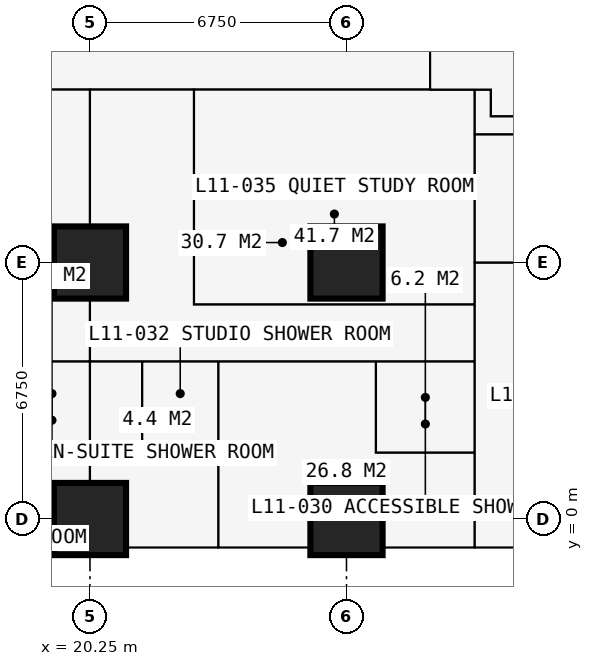
"""IFC4 building model, lengths in metres.
Left out: names, types, materials, properties, quantities, classifications, styles, units other than length and angle.
Written with IfcOpenShell. Run it as: python <this file> out.ifc"""

import sys

from ifc_helpers import new_model, si_unit, direction, frame, frame_2d, origin, origin_2d, place, context, subcontext, project, spatial, rectangle, extrude, element, fill, save


model = new_model("IFC4")
c1 = context("Model", 3, precision=1e-05, world=origin(), true_north=direction((0.0, 1.0)))
c2 = subcontext(c1, "Body", "Model", "MODEL_VIEW")
j1 = project(units=[si_unit("LENGTHUNIT", "METRE"), si_unit("PLANEANGLEUNIT", "RADIAN")], contexts=[c1])
p1 = place(None, origin())
s1 = spatial("IfcSite", under=j1, at=p1, CompositionType="ELEMENT")
p2 = place(p1, origin())
s2 = spatial("IfcBuilding", under=s1, at=p2, CompositionType="ELEMENT")
p3 = place(p2, frame((0.0, 0.0, 43.2)))
s3 = spatial("IfcBuildingStorey", under=s2, at=p3, CompositionType="ELEMENT", Elevation=43.2)
for number, where, z_axis, x_axis in (
    (1, (20.25, 0.0, 0.0), (0.0, 0.0, 1.0), (1.0, 0.0, 0.0)),
    (2, (20.25, 6.75, 0.0), (0.0, 0.0, 1.0), (1.0, 0.0, 0.0)),
    (3, (27.0, 0.0, 0.0), (0.0, 0.0, 1.0), (1.0, 0.0, 0.0)),
    (4, (27.0, 6.75, 0.0), (0.0, 0.0, 1.0), (1.0, 0.0, 0.0)),
):
    element("IfcColumn", number, at=place(p3, frame(where, z_axis=z_axis, x_axis=x_axis)), inside=s3, PredefinedType="COLUMN", context=c2, shape_type="SweptSolid", body=[
        extrude(rectangle(XDim=1.9, YDim=1.9, at=origin_2d()), origin(), (0.0, 0.0, 1.0), 3.6),
    ])
p4 = place(p3, frame((27.0, -0.75, 0.0), z_axis=(0.0, 0.0, 1.0), x_axis=(-1.0, 0.0, 0.0)))
e5 = element("IfcWall", 5, at=p4, inside=s3, PredefinedType="SOLIDWALL", context=c2, shape_type="SweptSolid", body=[
    extrude(rectangle(XDim=6.75, YDim=0.15, at=frame_2d((3.375, 0.0))), origin(), (0.0, 0.0, 1.0), 3.375),
])
p5 = place(p4, frame((0.996, 0.0, 0.0)))
e6 = element("IfcOpeningElement", 6, at=p5, cuts=e5, PredefinedType="OPENING", context=c2, shape_type="SweptSolid", body=[
    extrude(rectangle(XDim=1.0, YDim=2.2, at=frame_2d((0.5, 1.1))), frame((0.0, 0.085, 0.0), z_axis=(0.0, -1.0, 0.0), x_axis=(1.0, 0.0, 0.0)), (0.0, 0.0, 1.0), 0.17),
])
p6 = place(p4, frame((2.042, 0.0, 0.9)))
e7 = element("IfcOpeningElement", 7, at=p6, cuts=e5, PredefinedType="OPENING", context=c2, shape_type="SweptSolid", body=[
    extrude(rectangle(XDim=1.2, YDim=1.8, at=frame_2d((0.6, 0.9))), frame((0.0, 0.085, 0.0), z_axis=(0.0, -1.0, 0.0), x_axis=(1.0, 0.0, 0.0)), (0.0, 0.0, 1.0), 0.17),
])
p7 = place(p4, frame((4.754, 0.0, 0.0)))
e8 = element("IfcOpeningElement", 8, at=p7, cuts=e5, PredefinedType="OPENING", context=c2, shape_type="SweptSolid", body=[
    extrude(rectangle(XDim=1.0, YDim=2.2, at=frame_2d((0.5, 1.1))), frame((0.0, 0.085, 0.0), z_axis=(0.0, -1.0, 0.0), x_axis=(1.0, 0.0, 0.0)), (0.0, 0.0, 1.0), 0.17),
])
p8 = place(p4, frame((3.508, 0.0, 0.9)))
e9 = element("IfcOpeningElement", 9, at=p8, cuts=e5, PredefinedType="OPENING", context=c2, shape_type="SweptSolid", body=[
    extrude(rectangle(XDim=1.2, YDim=1.8, at=frame_2d((0.6, 0.9))), frame((0.0, 0.085, 0.0), z_axis=(0.0, -1.0, 0.0), x_axis=(1.0, 0.0, 0.0)), (0.0, 0.0, 1.0), 0.17),
])
p9 = place(p3, frame((23.625, -0.85, 0.0), z_axis=(0.0, 0.0, 1.0), x_axis=(0.0, -1.0, 0.0)))
e10 = element("IfcWall", 10, at=p9, inside=s3, PredefinedType="USERDEFINED", context=c2, shape_type="SweptSolid", body=[
    extrude(rectangle(XDim=2.2, YDim=1.0, at=frame_2d((1.1, 0.0))), origin(), (0.0, 0.0, 1.0), 0.9),
])
p10 = place(p3, frame((6.75, 4.15, 0.0), z_axis=(0.0, 0.0, 1.0), x_axis=(1.0, 0.0, 0.0)))
e11 = element("IfcWall", 11, at=p10, inside=s3, PredefinedType="PARTITIONING", context=c2, shape_type="SweptSolid", body=[
    extrude(rectangle(XDim=23.625, YDim=0.1, at=frame_2d((11.812, 0.0))), origin(), (0.0, 0.0, 1.0), 3.375),
])
p11 = place(p10, frame((0.2, 0.0, 0.0)))
e12 = element("IfcOpeningElement", 12, at=p11, cuts=e11, PredefinedType="OPENING", context=c2, shape_type="SweptSolid", body=[
    extrude(rectangle(XDim=0.95, YDim=2.2, at=frame_2d((0.475, 1.1))), frame((0.0, 0.06, 0.0), z_axis=(0.0, -1.0, 0.0), x_axis=(1.0, 0.0, 0.0)), (0.0, 0.0, 1.0), 0.12),
])
p12 = place(p10, frame((3.625, 0.0, 0.0)))
e13 = element("IfcOpeningElement", 13, at=p12, cuts=e11, PredefinedType="OPENING", context=c2, shape_type="SweptSolid", body=[
    extrude(rectangle(XDim=0.95, YDim=2.2, at=frame_2d((0.475, 1.1))), frame((0.0, 0.06, 0.0), z_axis=(0.0, -1.0, 0.0), x_axis=(1.0, 0.0, 0.0)), (0.0, 0.0, 1.0), 0.12),
])
p13 = place(p10, frame((7.0, 0.0, 0.0)))
e14 = element("IfcOpeningElement", 14, at=p13, cuts=e11, PredefinedType="OPENING", context=c2, shape_type="SweptSolid", body=[
    extrude(rectangle(XDim=0.95, YDim=2.2, at=frame_2d((0.475, 1.1))), frame((0.0, 0.06, 0.0), z_axis=(0.0, -1.0, 0.0), x_axis=(1.0, 0.0, 0.0)), (0.0, 0.0, 1.0), 0.12),
])
p14 = place(p10, frame((10.375, 0.0, 0.0)))
e15 = element("IfcOpeningElement", 15, at=p14, cuts=e11, PredefinedType="OPENING", context=c2, shape_type="SweptSolid", body=[
    extrude(rectangle(XDim=0.95, YDim=2.2, at=frame_2d((0.475, 1.1))), frame((0.0, 0.06, 0.0), z_axis=(0.0, -1.0, 0.0), x_axis=(1.0, 0.0, 0.0)), (0.0, 0.0, 1.0), 0.12),
])
p15 = place(p10, frame((18.475, 0.0, 0.0)))
e16 = element("IfcOpeningElement", 16, at=p15, cuts=e11, PredefinedType="OPENING", context=c2, shape_type="SweptSolid", body=[
    extrude(rectangle(XDim=0.95, YDim=2.2, at=frame_2d((0.475, 1.1))), frame((0.0, 0.06, 0.0), z_axis=(0.0, -1.0, 0.0), x_axis=(1.0, 0.0, 0.0)), (0.0, 0.0, 1.0), 0.12),
])
p16 = place(p10, frame((13.7, 0.0, 0.0)))
e17 = element("IfcOpeningElement", 17, at=p16, cuts=e11, PredefinedType="OPENING", context=c2, shape_type="SweptSolid", body=[
    extrude(rectangle(XDim=0.95, YDim=2.2, at=frame_2d((0.475, 1.1))), frame((0.0, 0.06, 0.0), z_axis=(0.0, -1.0, 0.0), x_axis=(1.0, 0.0, 0.0)), (0.0, 0.0, 1.0), 0.12),
])
p17 = place(p3, frame((10.125, 11.3, 0.0), z_axis=(0.0, 0.0, 1.0), x_axis=(1.0, 0.0, 0.0)))
e18 = element("IfcWall", 18, at=p17, inside=s3, PredefinedType="PARTITIONING", context=c2, shape_type="SweptSolid", body=[
    extrude(rectangle(XDim=20.675, YDim=0.15, at=frame_2d((10.337, 0.0))), origin(), (0.0, 0.0, 1.0), 3.375),
])
p18 = place(p17, frame((8.375, 0.0, 0.0)))
e19 = element("IfcOpeningElement", 19, at=p18, cuts=e18, PredefinedType="OPENING", context=c2, shape_type="SweptSolid", body=[
    extrude(rectangle(XDim=1.0, YDim=2.2, at=frame_2d((0.5, 1.1))), frame((0.0, 0.085, 0.0), z_axis=(0.0, -1.0, 0.0), x_axis=(1.0, 0.0, 0.0)), (0.0, 0.0, 1.0), 0.17),
])
p19 = place(p17, frame((10.975, 0.0, 0.0)))
e20 = element("IfcOpeningElement", 20, at=p19, cuts=e18, PredefinedType="OPENING", context=c2, shape_type="SweptSolid", body=[
    extrude(rectangle(XDim=1.0, YDim=2.2, at=frame_2d((0.5, 1.1))), frame((0.0, 0.085, 0.0), z_axis=(0.0, -1.0, 0.0), x_axis=(1.0, 0.0, 0.0)), (0.0, 0.0, 1.0), 0.17),
])
p20 = place(p17, frame((3.925, 0.0, 0.0)))
e21 = element("IfcOpeningElement", 21, at=p20, cuts=e18, PredefinedType="OPENING", context=c2, shape_type="SweptSolid", body=[
    extrude(rectangle(XDim=0.95, YDim=2.2, at=frame_2d((0.475, 1.1))), frame((0.0, 0.085, 0.0), z_axis=(0.0, -1.0, 0.0), x_axis=(1.0, 0.0, 0.0)), (0.0, 0.0, 1.0), 0.17),
])
p21 = place(p3, frame((18.25, 1.95, 0.0), z_axis=(0.0, 0.0, 1.0), x_axis=(1.0, 0.0, 0.0)))
e22 = element("IfcWall", 22, at=p21, inside=s3, PredefinedType="PARTITIONING", context=c2, shape_type="SweptSolid", body=[
    extrude(rectangle(XDim=2.0, YDim=0.1, at=frame_2d((1.0, 0.0))), origin(), (0.0, 0.0, 1.0), 3.375),
])
p22 = place(p3, frame((20.25, -0.734, 0.0), z_axis=(0.0, 0.0, 1.0), x_axis=(0.0, 1.0, 0.0)))
e23 = element("IfcWall", 23, at=p22, inside=s3, PredefinedType="PARTITIONING", context=c2, shape_type="SweptSolid", body=[
    extrude(rectangle(XDim=12.034, YDim=0.15, at=frame_2d((6.017, 0.0))), origin(), (0.0, 0.0, 1.0), 2.61),
])
p23 = place(p3, frame((21.625, 1.95, 0.0), z_axis=(0.0, 0.0, 1.0), x_axis=(0.0, 1.0, 0.0)))
e24 = element("IfcWall", 24, at=p23, inside=s3, PredefinedType="PARTITIONING", context=c2, shape_type="SweptSolid", body=[
    extrude(rectangle(XDim=2.2, YDim=0.1, at=frame_2d((1.1, 0.0))), origin(), (0.0, 0.0, 1.0), 3.375),
])
p24 = place(p3, frame((21.625, 1.95, 0.0), z_axis=(0.0, 0.0, 1.0), x_axis=(1.0, 0.0, 0.0)))
e25 = element("IfcWall", 25, at=p24, inside=s3, PredefinedType="PARTITIONING", context=c2, shape_type="SweptSolid", body=[
    extrude(rectangle(XDim=2.0, YDim=0.1, at=frame_2d((1.0, 0.0))), origin(), (0.0, 0.0, 1.0), 3.375),
])
p25 = place(p3, frame((22.988, 5.65, 0.0), z_axis=(0.0, 0.0, 1.0), x_axis=(1.0, 0.0, 0.0)))
e26 = element("IfcWall", 26, at=p25, inside=s3, PredefinedType="PARTITIONING", context=c2, shape_type="SweptSolid", body=[
    extrude(rectangle(XDim=7.387, YDim=0.15, at=frame_2d((3.694, 0.0))), origin(), (0.0, 0.0, 1.0), 3.375),
])
p26 = place(p25, frame((2.1, 0.0, 0.0)))
e27 = element("IfcOpeningElement", 27, at=p26, cuts=e26, PredefinedType="OPENING", context=c2, shape_type="SweptSolid", body=[
    extrude(rectangle(XDim=0.95, YDim=2.2, at=frame_2d((0.475, 1.1))), frame((0.0, 0.085, 0.0), z_axis=(0.0, -1.0, 0.0), x_axis=(1.0, 0.0, 0.0)), (0.0, 0.0, 1.0), 0.17),
])
p27 = place(p3, frame((22.988, 5.65, 0.0), z_axis=(0.0, 0.0, 1.0), x_axis=(0.0, 1.0, 0.0)))
e28 = element("IfcWall", 28, at=p27, inside=s3, PredefinedType="PARTITIONING", context=c2, shape_type="SweptSolid", body=[
    extrude(rectangle(XDim=5.65, YDim=0.15, at=frame_2d((2.825, 0.0))), origin(), (0.0, 0.0, 1.0), 3.375),
])
p28 = place(p3, frame((23.625, -0.734, 0.0), z_axis=(0.0, 0.0, 1.0), x_axis=(0.0, 1.0, 0.0)))
e29 = element("IfcWall", 29, at=p28, inside=s3, PredefinedType="PARTITIONING", context=c2, shape_type="SweptSolid", body=[
    extrude(rectangle(XDim=4.884, YDim=0.175, at=frame_2d((2.442, 0.0))), origin(), (0.0, 0.0, 1.0), 3.375),
])
p29 = place(p28, frame((3.334, 0.0, 0.0)))
e30 = element("IfcOpeningElement", 30, at=p29, cuts=e29, PredefinedType="OPENING", context=c2, shape_type="SweptSolid", body=[
    extrude(rectangle(XDim=0.9, YDim=2.2, at=frame_2d((0.45, 1.1))), frame((0.0, 0.097, 0.0), z_axis=(0.0, -1.0, 0.0), x_axis=(1.0, 0.0, 0.0)), (0.0, 0.0, 1.0), 0.195),
])
p30 = place(p3, frame((27.775, 1.75, 0.0), z_axis=(0.0, 0.0, 1.0), x_axis=(0.0, 1.0, 0.0)))
e31 = element("IfcWall", 31, at=p30, inside=s3, PredefinedType="PARTITIONING", context=c2, shape_type="SweptSolid", body=[
    extrude(rectangle(XDim=2.4, YDim=0.1, at=frame_2d((1.2, 0.0))), origin(), (0.0, 0.0, 1.0), 3.375),
])
p31 = place(p3, frame((27.775, 1.75, 0.0), z_axis=(0.0, 0.0, 1.0), x_axis=(1.0, 0.0, 0.0)))
e32 = element("IfcWall", 32, at=p31, inside=s3, PredefinedType="PARTITIONING", context=c2, shape_type="SweptSolid", body=[
    extrude(rectangle(XDim=2.6, YDim=0.1, at=frame_2d((1.3, 0.0))), origin(), (0.0, 0.0, 1.0), 3.375),
])
p32 = place(p31, frame((0.85, 0.0, 0.0)))
e33 = element("IfcOpeningElement", 33, at=p32, cuts=e32, PredefinedType="OPENING", context=c2, shape_type="SweptSolid", body=[
    extrude(rectangle(XDim=0.9, YDim=2.2, at=frame_2d((0.45, 1.1))), frame((0.0, 0.06, 0.0), z_axis=(0.0, -1.0, 0.0), x_axis=(1.0, 0.0, 0.0)), (0.0, 0.0, 1.0), 0.12),
])
p33 = place(p3, frame((29.2, 11.3, 0.0), z_axis=(0.0, 0.0, 1.0), x_axis=(0.0, 1.0, 0.0)))
e34 = element("IfcWall", 34, at=p33, inside=s3, PredefinedType="PARTITIONING", context=c2, shape_type="SweptSolid", body=[
    extrude(rectangle(XDim=17.9, YDim=0.2, at=frame_2d((8.95, 0.0))), origin(), (0.0, 0.0, 1.0), 3.375),
])
p34 = place(p33, frame((8.35, 0.0, 0.0)))
e35 = element("IfcOpeningElement", 35, at=p34, cuts=e34, PredefinedType="OPENING", context=c2, shape_type="SweptSolid", body=[
    extrude(rectangle(XDim=1.2, YDim=2.2, at=frame_2d((0.6, 1.1))), frame((0.0, 0.11, 0.0), z_axis=(0.0, -1.0, 0.0), x_axis=(1.0, 0.0, 0.0)), (0.0, 0.0, 1.0), 0.22),
])
p35 = place(p3, frame((30.375, -0.734, 0.0), z_axis=(0.0, 0.0, 1.0), x_axis=(0.0, 1.0, 0.0)))
e36 = element("IfcWall", 36, at=p35, inside=s3, PredefinedType="PARTITIONING", context=c2, shape_type="SweptSolid", body=[
    extrude(rectangle(XDim=12.034, YDim=0.15, at=frame_2d((6.017, 0.0))), origin(), (0.0, 0.0, 1.0), 3.375),
])
p36 = place(p3, frame((30.375, 6.75, 0.0), z_axis=(0.0, 0.0, 1.0), x_axis=(1.0, 0.0, 0.0)))
e37 = element("IfcWall", 37, at=p36, inside=s3, PredefinedType="PARTITIONING", context=c2, shape_type="SweptSolid", body=[
    extrude(rectangle(XDim=10.859, YDim=0.15, at=frame_2d((5.429, 0.0))), origin(), (0.0, 0.0, 1.0), 2.877),
])
p37 = place(p36, frame((1.4, 0.0, 0.0)))
e38 = element("IfcOpeningElement", 38, at=p37, cuts=e37, PredefinedType="OPENING", context=c2, shape_type="SweptSolid", body=[
    extrude(rectangle(XDim=1.0, YDim=2.2, at=frame_2d((0.5, 1.1))), frame((0.0, 0.085, 0.0), z_axis=(0.0, -1.0, 0.0), x_axis=(1.0, 0.0, 0.0)), (0.0, 0.0, 1.0), 0.17),
])
p38 = place(p3, frame((30.375, 10.125, 0.0), z_axis=(0.0, 0.0, 1.0), x_axis=(1.0, 0.0, 0.0)))
e39 = element("IfcWall", 39, at=p38, inside=s3, PredefinedType="PARTITIONING", context=c2, shape_type="SweptSolid", body=[
    extrude(rectangle(XDim=10.859, YDim=0.15, at=frame_2d((5.429, 0.0))), origin(), (0.0, 0.0, 1.0), 3.375),
])
p39 = place(p38, frame((2.5, 0.0, 0.0)))
e40 = element("IfcOpeningElement", 40, at=p39, cuts=e39, PredefinedType="OPENING", context=c2, shape_type="SweptSolid", body=[
    extrude(rectangle(XDim=1.0, YDim=2.2, at=frame_2d((0.5, 1.1))), frame((0.0, 0.085, 0.0), z_axis=(0.0, -1.0, 0.0), x_axis=(1.0, 0.0, 0.0)), (0.0, 0.0, 1.0), 0.17),
])
p40 = place(p3, frame((30.8, 10.6, 0.0), z_axis=(0.0, 0.0, 1.0), x_axis=(0.0, 1.0, 0.0)))
e41 = element("IfcWall", 41, at=p40, inside=s3, PredefinedType="PARTITIONING", context=c2, shape_type="SweptSolid", body=[
    extrude(rectangle(XDim=0.7, YDim=0.15, at=frame_2d((0.35, 0.0))), origin(), (0.0, 0.0, 1.0), 3.375),
])
p41 = place(p3, frame((30.8, 10.6, 0.0), z_axis=(0.0, 0.0, 1.0), x_axis=(1.0, 0.0, 0.0)))
e42 = element("IfcWall", 42, at=p41, inside=s3, PredefinedType="PARTITIONING", context=c2, shape_type="SweptSolid", body=[
    extrude(rectangle(XDim=1.85, YDim=0.15, at=frame_2d((0.925, 0.0))), origin(), (0.0, 0.0, 1.0), 3.375),
])
p42 = place(p5, origin())
e43 = element("IfcDoor", 43, at=p42, inside=s3, OperationType="SINGLE_SWING_LEFT", PredefinedType="DOOR", context=c2, shape_type="SweptSolid", body=[
    extrude(rectangle(XDim=1.0, YDim=2.2, at=frame_2d((0.5, 1.1))), frame((0.0, 0.025, 0.0), z_axis=(0.0, -1.0, 0.0), x_axis=(1.0, 0.0, 0.0)), (0.0, 0.0, 1.0), 0.05),
])
fill(e6, e43)
p43 = place(p6, origin())
e44 = element("IfcWindow", 44, at=p43, inside=s3, PartitioningType="SINGLE_PANEL", PredefinedType="WINDOW", context=c2, shape_type="SweptSolid", body=[
    extrude(rectangle(XDim=1.2, YDim=1.8, at=frame_2d((0.6, 0.9))), frame((0.0, 0.03, 0.0), z_axis=(0.0, -1.0, 0.0), x_axis=(1.0, 0.0, 0.0)), (0.0, 0.0, 1.0), 0.06),
])
fill(e7, e44)
p44 = place(p7, origin())
e45 = element("IfcDoor", 45, at=p44, inside=s3, OperationType="SINGLE_SWING_RIGHT", PredefinedType="DOOR", context=c2, shape_type="SweptSolid", body=[
    extrude(rectangle(XDim=1.0, YDim=2.2, at=frame_2d((0.5, 1.1))), frame((0.0, 0.025, 0.0), z_axis=(0.0, -1.0, 0.0), x_axis=(1.0, 0.0, 0.0)), (0.0, 0.0, 1.0), 0.05),
])
fill(e8, e45)
p45 = place(p8, origin())
e46 = element("IfcWindow", 46, at=p45, inside=s3, PartitioningType="SINGLE_PANEL", PredefinedType="WINDOW", context=c2, shape_type="SweptSolid", body=[
    extrude(rectangle(XDim=1.2, YDim=1.8, at=frame_2d((0.6, 0.9))), frame((0.0, 0.03, 0.0), z_axis=(0.0, -1.0, 0.0), x_axis=(1.0, 0.0, 0.0)), (0.0, 0.0, 1.0), 0.06),
])
fill(e9, e46)
p46 = place(p18, origin())
e47 = element("IfcDoor", 47, at=p46, inside=s3, OperationType="SINGLE_SWING_LEFT", PredefinedType="DOOR", context=c2, shape_type="SweptSolid", body=[
    extrude(rectangle(XDim=1.0, YDim=2.2, at=frame_2d((0.5, 1.1))), frame((0.0, 0.025, 0.0), z_axis=(0.0, -1.0, 0.0), x_axis=(1.0, 0.0, 0.0)), (0.0, 0.0, 1.0), 0.05),
])
fill(e19, e47)
p47 = place(p15, origin())
e48 = element("IfcDoor", 48, at=p47, inside=s3, OperationType="SINGLE_SWING_LEFT", PredefinedType="DOOR", context=c2, shape_type="SweptSolid", body=[
    extrude(rectangle(XDim=0.95, YDim=2.2, at=frame_2d((0.475, 1.1))), frame((0.0, 0.025, 0.0), z_axis=(0.0, -1.0, 0.0), x_axis=(1.0, 0.0, 0.0)), (0.0, 0.0, 1.0), 0.05),
])
fill(e16, e48)
p48 = place(p32, origin())
e49 = element("IfcDoor", 49, at=p48, inside=s3, OperationType="SINGLE_SWING_RIGHT", PredefinedType="DOOR", context=c2, shape_type="SweptSolid", body=[
    extrude(rectangle(XDim=0.9, YDim=2.2, at=frame_2d((0.45, 1.1))), frame((0.0, 0.025, 0.0), z_axis=(0.0, -1.0, 0.0), x_axis=(1.0, 0.0, 0.0)), (0.0, 0.0, 1.0), 0.05),
])
fill(e33, e49)
p49 = place(p16, origin())
e50 = element("IfcDoor", 50, at=p49, inside=s3, OperationType="SINGLE_SWING_LEFT", PredefinedType="DOOR", context=c2, shape_type="SweptSolid", body=[
    extrude(rectangle(XDim=0.95, YDim=2.2, at=frame_2d((0.475, 1.1))), frame((0.0, 0.025, 0.0), z_axis=(0.0, -1.0, 0.0), x_axis=(1.0, 0.0, 0.0)), (0.0, 0.0, 1.0), 0.05),
])
fill(e17, e50)
p50 = place(p29, origin())
e51 = element("IfcDoor", 51, at=p50, inside=s3, OperationType="SINGLE_SWING_RIGHT", PredefinedType="DOOR", context=c2, shape_type="SweptSolid", body=[
    extrude(rectangle(XDim=0.9, YDim=2.2, at=frame_2d((0.45, 1.1))), frame((0.0, 0.025, 0.0), z_axis=(0.0, -1.0, 0.0), x_axis=(1.0, 0.0, 0.0)), (0.0, 0.0, 1.0), 0.05),
])
fill(e30, e51)
p51 = place(p19, origin())
e52 = element("IfcDoor", 52, at=p51, inside=s3, OperationType="SINGLE_SWING_LEFT", PredefinedType="DOOR", context=c2, shape_type="SweptSolid", body=[
    extrude(rectangle(XDim=1.0, YDim=2.2, at=frame_2d((0.5, 1.1))), frame((0.0, 0.025, 0.0), z_axis=(0.0, -1.0, 0.0), x_axis=(1.0, 0.0, 0.0)), (0.0, 0.0, 1.0), 0.05),
])
fill(e20, e52)
p52 = place(p26, origin())
e53 = element("IfcDoor", 53, at=p52, inside=s3, OperationType="SINGLE_SWING_LEFT", PredefinedType="DOOR", context=c2, shape_type="SweptSolid", body=[
    extrude(rectangle(XDim=0.95, YDim=2.2, at=frame_2d((0.475, 1.1))), frame((0.0, 0.025, 0.0), z_axis=(0.0, -1.0, 0.0), x_axis=(1.0, 0.0, 0.0)), (0.0, 0.0, 1.0), 0.05),
])
fill(e27, e53)
save(model, sys.argv[1])
